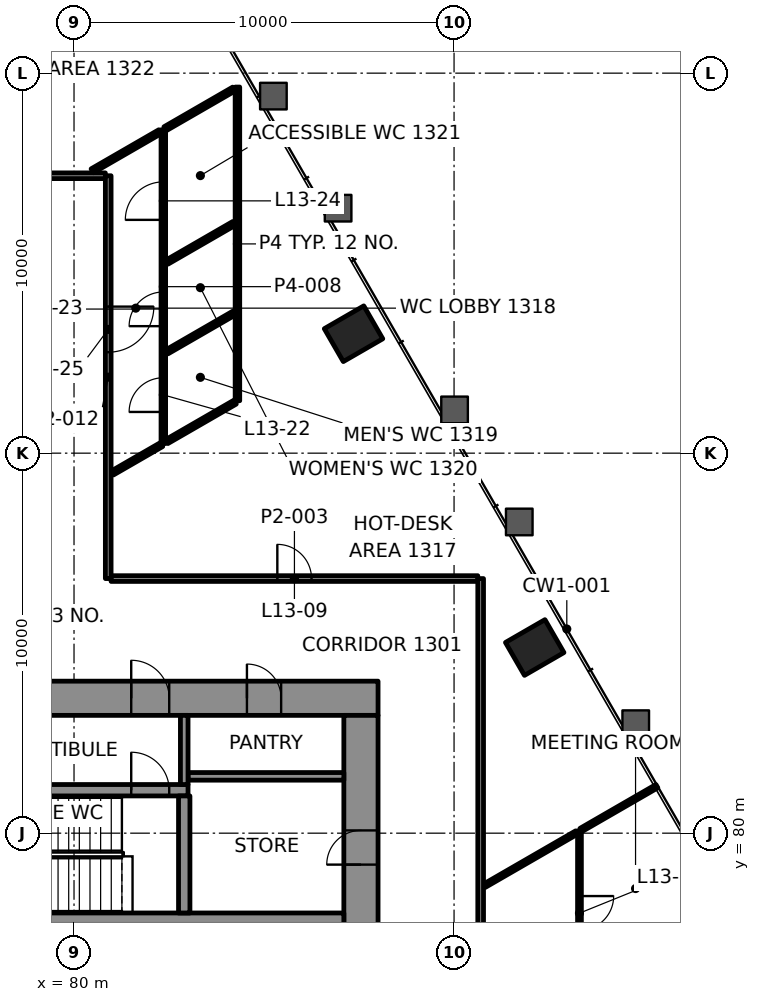
"""IFC4 building model, lengths in metres.
Left out: names, types, materials, properties, quantities, classifications, styles, units other than length and angle.
Written with IfcOpenShell. Run it as: python <this file> out.ifc"""

import sys

from ifc_helpers import new_model, si_unit, direction, frame, frame_2d, origin, origin_2d, place, context, subcontext, project, spatial, rectangle, extrude, element, fill, save


model = new_model("IFC4")
c1 = context("Model", 3, precision=1e-05, world=origin(), true_north=direction((0.0, 1.0)))
c2 = subcontext(c1, "Body", "Model", "MODEL_VIEW")
j1 = project(units=[si_unit("LENGTHUNIT", "METRE"), si_unit("PLANEANGLEUNIT", "RADIAN")], contexts=[c1])
p1 = place(None, origin())
s1 = spatial("IfcSite", under=j1, at=p1, CompositionType="ELEMENT")
p2 = place(p1, origin())
s2 = spatial("IfcBuilding", under=s1, at=p2, CompositionType="ELEMENT")
p3 = place(p2, frame((0.0, 0.0, 61.0)))
s3 = spatial("IfcBuildingStorey", under=s2, at=p3, CompositionType="ELEMENT", Elevation=61.0)
for number, where, z_axis, x_axis in (
    (1, (92.122, 84.885, -0.0), (0.0, 0.0, 1.0), (-0.5, 0.866, 0.0)),
    (2, (87.355, 93.143, -0.0), (0.0, 0.0, 1.0), (-0.5, 0.866, 0.0)),
):
    element("IfcColumn", number, at=place(p3, frame(where, z_axis=z_axis, x_axis=x_axis)), inside=s3, PredefinedType="COLUMN", context=c2, shape_type="SweptSolid", body=[
        extrude(rectangle(XDim=1.0, YDim=1.2, at=origin_2d()), origin(), (0.0, 0.0, 1.0), 4.2),
    ])
p4 = place(p3, frame((62.0, 83.55, 0.0), z_axis=(0.0, 0.0, 1.0), x_axis=(1.0, 0.0, 0.0)))
e3 = element("IfcWall", 3, at=p4, inside=s3, PredefinedType="SHEAR", context=c2, shape_type="SweptSolid", body=[
    extrude(rectangle(XDim=26.0, YDim=0.9, at=frame_2d((13.0, 0.0))), origin(), (0.0, 0.0, 1.0), 4.0),
])
p5 = place(p4, frame((5.695, 0.0, 0.0)))
e4 = element("IfcOpeningElement", 4, at=p5, cuts=e3, PredefinedType="OPENING", context=c2, shape_type="SweptSolid", body=[
    extrude(rectangle(XDim=1.0, YDim=2.1, at=frame_2d((0.5, 1.05))), frame((0.0, 0.46, 0.0), z_axis=(0.0, -1.0, 0.0), x_axis=(1.0, 0.0, 0.0)), (0.0, 0.0, 1.0), 0.92),
])
p6 = place(p4, frame((19.505, 0.0, 0.0)))
e5 = element("IfcOpeningElement", 5, at=p6, cuts=e3, PredefinedType="OPENING", context=c2, shape_type="SweptSolid", body=[
    extrude(rectangle(XDim=1.0, YDim=2.1, at=frame_2d((0.5, 1.05))), frame((0.0, 0.46, 0.0), z_axis=(0.0, -1.0, 0.0), x_axis=(1.0, 0.0, 0.0)), (0.0, 0.0, 1.0), 0.92),
])
p7 = place(p4, frame((3.45, 0.0, 0.0)))
e6 = element("IfcOpeningElement", 6, at=p7, cuts=e3, PredefinedType="OPENING", context=c2, shape_type="SweptSolid", body=[
    extrude(rectangle(XDim=0.9, YDim=2.1, at=frame_2d((0.45, 1.05))), frame((0.0, 0.46, 0.0), z_axis=(0.0, -1.0, 0.0), x_axis=(1.0, 0.0, 0.0)), (0.0, 0.0, 1.0), 0.92),
])
p8 = place(p4, frame((12.65, 0.0, 0.0)))
e7 = element("IfcOpeningElement", 7, at=p8, cuts=e3, PredefinedType="OPENING", context=c2, shape_type="SweptSolid", body=[
    extrude(rectangle(XDim=0.9, YDim=2.1, at=frame_2d((0.45, 1.05))), frame((0.0, 0.46, 0.0), z_axis=(0.0, -1.0, 0.0), x_axis=(1.0, 0.0, 0.0)), (0.0, 0.0, 1.0), 0.92),
])
p9 = place(p4, frame((22.55, 0.0, 0.0)))
e8 = element("IfcOpeningElement", 8, at=p9, cuts=e3, PredefinedType="OPENING", context=c2, shape_type="SweptSolid", body=[
    extrude(rectangle(XDim=0.9, YDim=2.1, at=frame_2d((0.45, 1.05))), frame((0.0, 0.46, 0.0), z_axis=(0.0, -1.0, 0.0), x_axis=(1.0, 0.0, 0.0)), (0.0, 0.0, 1.0), 0.92),
])
p10 = place(p3, frame((87.55, 66.9, 0.0), z_axis=(0.0, 0.0, 1.0), x_axis=(0.0, 1.0, 0.0)))
e9 = element("IfcWall", 9, at=p10, inside=s3, PredefinedType="SHEAR", context=c2, shape_type="SweptSolid", body=[
    extrude(rectangle(XDim=16.2, YDim=0.9, at=frame_2d((8.1, 0.0))), origin(), (0.0, 0.0, 1.0), 4.0),
])
p11 = place(p10, frame((5.5, 0.0, 0.0)))
e10 = element("IfcOpeningElement", 10, at=p11, cuts=e9, PredefinedType="OPENING", context=c2, shape_type="SweptSolid", body=[
    extrude(rectangle(XDim=1.8, YDim=2.1, at=frame_2d((0.9, 1.05))), frame((0.0, 0.46, 0.0), z_axis=(0.0, -1.0, 0.0), x_axis=(1.0, 0.0, 0.0)), (0.0, 0.0, 1.0), 0.92),
])
p12 = place(p10, frame((12.272, 0.0, 0.0)))
e11 = element("IfcOpeningElement", 11, at=p12, cuts=e9, PredefinedType="OPENING", context=c2, shape_type="SweptSolid", body=[
    extrude(rectangle(XDim=0.9, YDim=2.1, at=frame_2d((0.45, 1.05))), frame((0.0, 0.46, 0.0), z_axis=(0.0, -1.0, 0.0), x_axis=(1.0, 0.0, 0.0)), (0.0, 0.0, 1.0), 0.92),
])
p13 = place(p3, frame((64.35, 77.75, 0.0), z_axis=(0.0, 0.0, 1.0), x_axis=(1.0, 0.0, 0.0)))
e12 = element("IfcWall", 12, at=p13, inside=s3, PredefinedType="SHEAR", context=c2, shape_type="SweptSolid", body=[
    extrude(rectangle(XDim=22.75, YDim=0.3, at=frame_2d((11.375, 0.0))), origin(), (0.0, 0.0, 1.0), 4.0),
])
p14 = place(p13, frame((3.345, 0.0, 0.0)))
e13 = element("IfcOpeningElement", 13, at=p14, cuts=e12, PredefinedType="OPENING", context=c2, shape_type="SweptSolid", body=[
    extrude(rectangle(XDim=1.0, YDim=2.1, at=frame_2d((0.5, 1.05))), frame((0.0, 0.16, 0.0), z_axis=(0.0, -1.0, 0.0), x_axis=(1.0, 0.0, 0.0)), (0.0, 0.0, 1.0), 0.32),
])
p15 = place(p3, frame((76.14, 81.13, 0.0), z_axis=(0.0, 0.0, 1.0), x_axis=(1.0, 0.0, 0.0)))
e14 = element("IfcWall", 14, at=p15, inside=s3, PredefinedType="SHEAR", context=c2, shape_type="SweptSolid", body=[
    extrude(rectangle(XDim=6.86, YDim=0.3, at=frame_2d((3.43, 0.0))), origin(), (0.0, 0.0, 1.0), 4.0),
])
p16 = place(p15, frame((5.365, 0.0, 0.0)))
e15 = element("IfcOpeningElement", 15, at=p16, cuts=e14, PredefinedType="OPENING", context=c2, shape_type="SweptSolid", body=[
    extrude(rectangle(XDim=1.0, YDim=2.1, at=frame_2d((0.5, 1.05))), frame((0.0, 0.16, 0.0), z_axis=(0.0, -1.0, 0.0), x_axis=(1.0, 0.0, 0.0)), (0.0, 0.0, 1.0), 0.32),
])
p17 = place(p3, frame((82.9, 77.9, 0.0), z_axis=(0.0, 0.0, 1.0), x_axis=(0.0, 1.0, 0.0)))
e16 = element("IfcWall", 16, at=p17, inside=s3, PredefinedType="SHEAR", context=c2, shape_type="SweptSolid", body=[
    extrude(rectangle(XDim=3.08, YDim=0.3, at=frame_2d((1.54, 0.0))), origin(), (0.0, 0.0, 1.0), 4.0),
])
p18 = place(p3, frame((80.975, 86.7, 0.0), z_axis=(0.0, 0.0, 1.0), x_axis=(1.0, 0.0, 0.0)))
e17 = element("IfcWall", 17, at=p18, inside=s3, PredefinedType="PARTITIONING", context=c2, shape_type="SweptSolid", body=[
    extrude(rectangle(XDim=9.649, YDim=0.15, at=frame_2d((4.825, 0.0))), origin(), (0.0, 0.0, 1.0), 3.4),
])
p19 = place(p18, frame((4.375, 0.0, 0.0)))
e18 = element("IfcOpeningElement", 18, at=p19, cuts=e17, PredefinedType="OPENING", context=c2, shape_type="SweptSolid", body=[
    extrude(rectangle(XDim=0.9, YDim=2.1, at=frame_2d((0.45, 1.05))), frame((0.0, 0.085, 0.0), z_axis=(0.0, -1.0, 0.0), x_axis=(1.0, 0.0, 0.0)), (0.0, 0.0, 1.0), 0.17),
])
p20 = place(p3, frame((75.975, 97.3, 0.0), z_axis=(0.0, 0.0, 1.0), x_axis=(1.0, 0.0, 0.0)))
e19 = element("IfcWall", 19, at=p20, inside=s3, PredefinedType="PARTITIONING", context=c2, shape_type="SweptSolid", body=[
    extrude(rectangle(XDim=4.85, YDim=0.15, at=frame_2d((2.425, 0.0))), origin(), (0.0, 0.0, 1.0), 3.4),
])
p21 = place(p20, frame((1.792, 0.0, 0.0)))
e20 = element("IfcOpeningElement", 20, at=p21, cuts=e19, PredefinedType="OPENING", context=c2, shape_type="SweptSolid", body=[
    extrude(rectangle(XDim=0.9, YDim=2.1, at=frame_2d((0.45, 1.05))), frame((0.0, 0.085, 0.0), z_axis=(0.0, -1.0, 0.0), x_axis=(1.0, 0.0, 0.0)), (0.0, 0.0, 1.0), 0.17),
])
p22 = place(p3, frame((93.376, 75.976, 0.0), z_axis=(0.0, 0.0, 1.0), x_axis=(0.866006192811, 0.500033272906, 0.0)))
e21 = element("IfcWall", 21, at=p22, inside=s3, PredefinedType="PARTITIONING", context=c2, shape_type="SweptSolid", body=[
    extrude(rectangle(XDim=4.329, YDim=0.1, at=frame_2d((2.165, 0.0))), origin(), (0.0, 0.0, 1.0), 3.165),
])
p23 = place(p3, frame((90.801, 78.618, 0.0), z_axis=(0.0, 0.0, 1.0), x_axis=(0.866028733576, 0.499994232587, 0.0)))
e22 = element("IfcWall", 22, at=p23, inside=s3, PredefinedType="PARTITIONING", context=c2, shape_type="SweptSolid", body=[
    extrude(rectangle(XDim=2.799, YDim=0.1, at=frame_2d((1.4, 0.0))), origin(), (0.0, 0.0, 1.0), 3.4),
])
p24 = place(p3, frame((81.01, 89.479, 0.0), z_axis=(0.0, 0.0, 1.0), x_axis=(0.866055123991, 0.49994851956, 0.0)))
e23 = element("IfcWall", 23, at=p24, inside=s3, PredefinedType="PARTITIONING", context=c2, shape_type="SweptSolid", body=[
    extrude(rectangle(XDim=1.496, YDim=0.12, at=frame_2d((0.748, 0.0))), origin(), (0.0, 0.0, 1.0), 3.4),
])
for number, where, z_axis, x_axis in (
    (24, (82.445, 92.666, 0.0), (0.0, 0.0, 1.0), (0.866, 0.5, 0.0)),
    (25, (82.444, 95.026, 0.0), (0.0, 0.0, 1.0), (0.866, 0.5, 0.0)),
):
    element("IfcWall", number, at=place(p3, frame(where, z_axis=z_axis, x_axis=x_axis)), inside=s3, PredefinedType="PARTITIONING", context=c2, shape_type="SweptSolid", body=[
        extrude(rectangle(XDim=2.033, YDim=0.12, at=frame_2d((1.017, 0.0))), origin(), (0.0, 0.0, 1.0), 3.4),
    ])
p25 = place(p3, frame((80.479, 97.43, 0.0), z_axis=(0.0, 0.0, 1.0), x_axis=(0.866057052383, 0.499945179012, 0.0)))
e26 = element("IfcWall", 26, at=p25, inside=s3, PredefinedType="PARTITIONING", context=c2, shape_type="SweptSolid", body=[
    extrude(rectangle(XDim=2.056, YDim=0.12, at=frame_2d((1.028, 0.0))), origin(), (0.0, 0.0, 1.0), 3.4),
])
p26 = place(p3, frame((93.3, 80.061, 0.0), z_axis=(0.0, 0.0, 1.0), x_axis=(0.0, -1.0, 0.0)))
e27 = element("IfcWall", 27, at=p26, inside=s3, PredefinedType="PARTITIONING", context=c2, shape_type="SweptSolid", body=[
    extrude(rectangle(XDim=11.527, YDim=0.1, at=frame_2d((5.764, 0.0))), origin(), (0.0, 0.0, 1.0), 3.4),
])
p27 = place(p26, frame((1.716, 0.0, 0.0)))
e28 = element("IfcOpeningElement", 28, at=p27, cuts=e27, PredefinedType="OPENING", context=c2, shape_type="SweptSolid", body=[
    extrude(rectangle(XDim=0.9, YDim=2.1, at=frame_2d((0.45, 1.05))), frame((0.0, 0.06, 0.0), z_axis=(0.0, -1.0, 0.0), x_axis=(1.0, 0.0, 0.0)), (0.0, 0.0, 1.0), 0.12),
])
p28 = place(p26, frame((5.741, 0.0, 0.0)))
e29 = element("IfcOpeningElement", 29, at=p28, cuts=e27, PredefinedType="OPENING", context=c2, shape_type="SweptSolid", body=[
    extrude(rectangle(XDim=0.9, YDim=2.1, at=frame_2d((0.45, 1.05))), frame((0.0, 0.06, 0.0), z_axis=(0.0, -1.0, 0.0), x_axis=(1.0, 0.0, 0.0)), (0.0, 0.0, 1.0), 0.12),
])
p29 = place(p26, frame((9.342, 0.0, 0.0)))
e30 = element("IfcOpeningElement", 30, at=p29, cuts=e27, PredefinedType="OPENING", context=c2, shape_type="SweptSolid", body=[
    extrude(rectangle(XDim=0.9, YDim=2.1, at=frame_2d((0.45, 1.05))), frame((0.0, 0.06, 0.0), z_axis=(0.0, -1.0, 0.0), x_axis=(1.0, 0.0, 0.0)), (0.0, 0.0, 1.0), 0.12),
])
p30 = place(p3, frame((90.7, 86.699, 0.0), z_axis=(0.0, 0.0, 1.0), x_axis=(0.0, -1.0, 0.0)))
e31 = element("IfcWall", 31, at=p30, inside=s3, PredefinedType="PARTITIONING", context=c2, shape_type="SweptSolid", body=[
    extrude(rectangle(XDim=19.725, YDim=0.15, at=frame_2d((9.862, 0.0))), origin(), (0.0, 0.0, 1.0), 3.4),
])
p31 = place(p30, frame((11.768, 0.0, 0.0)))
e32 = element("IfcOpeningElement", 32, at=p31, cuts=e31, PredefinedType="OPENING", context=c2, shape_type="SweptSolid", body=[
    extrude(rectangle(XDim=1.0, YDim=2.1, at=frame_2d((0.5, 1.05))), frame((0.0, 0.085, 0.0), z_axis=(0.0, -1.0, 0.0), x_axis=(1.0, 0.0, 0.0)), (0.0, 0.0, 1.0), 0.17),
])
p32 = place(p30, frame((17.459, 0.0, 0.0)))
e33 = element("IfcOpeningElement", 33, at=p32, cuts=e31, PredefinedType="OPENING", context=c2, shape_type="SweptSolid", body=[
    extrude(rectangle(XDim=1.0, YDim=2.1, at=frame_2d((0.5, 1.05))), frame((0.0, 0.085, 0.0), z_axis=(0.0, -1.0, 0.0), x_axis=(1.0, 0.0, 0.0)), (0.0, 0.0, 1.0), 0.17),
])
p33 = place(p3, frame((84.3, 91.379, 0.0), z_axis=(0.0, 0.0, 1.0), x_axis=(0.0, 1.0, 0.0)))
e34 = element("IfcWall", 34, at=p33, inside=s3, PredefinedType="PARTITIONING", context=c2, shape_type="SweptSolid", body=[
    extrude(rectangle(XDim=8.255, YDim=0.12, at=frame_2d((4.127, 0.0))), origin(), (0.0, 0.0, 1.0), 3.165),
])
p34 = place(p3, frame((82.35, 90.253, 0.0), z_axis=(0.0, 0.0, 1.0), x_axis=(0.0, 1.0, 0.0)))
e35 = element("IfcWall", 35, at=p34, inside=s3, PredefinedType="PARTITIONING", context=c2, shape_type="SweptSolid", body=[
    extrude(rectangle(XDim=8.257, YDim=0.12, at=frame_2d((4.128, 0.0))), origin(), (0.0, 0.0, 1.0), 3.4),
])
p35 = place(p34, frame((0.831, 0.0, 0.0)))
e36 = element("IfcOpeningElement", 36, at=p35, cuts=e35, PredefinedType="OPENING", context=c2, shape_type="SweptSolid", body=[
    extrude(rectangle(XDim=0.9, YDim=2.1, at=frame_2d((0.45, 1.05))), frame((0.0, 0.07, 0.0), z_axis=(0.0, -1.0, 0.0), x_axis=(1.0, 0.0, 0.0)), (0.0, 0.0, 1.0), 0.14),
])
p36 = place(p34, frame((3.089, 0.0, 0.0)))
e37 = element("IfcOpeningElement", 37, at=p36, cuts=e35, PredefinedType="OPENING", context=c2, shape_type="SweptSolid", body=[
    extrude(rectangle(XDim=0.9, YDim=2.1, at=frame_2d((0.45, 1.05))), frame((0.0, 0.07, 0.0), z_axis=(0.0, -1.0, 0.0), x_axis=(1.0, 0.0, 0.0)), (0.0, 0.0, 1.0), 0.14),
])
p37 = place(p34, frame((5.886, 0.0, 0.0)))
e38 = element("IfcOpeningElement", 38, at=p37, cuts=e35, PredefinedType="OPENING", context=c2, shape_type="SweptSolid", body=[
    extrude(rectangle(XDim=1.0, YDim=2.1, at=frame_2d((0.5, 1.05))), frame((0.0, 0.07, 0.0), z_axis=(0.0, -1.0, 0.0), x_axis=(1.0, 0.0, 0.0)), (0.0, 0.0, 1.0), 0.14),
])
p38 = place(p3, frame((80.9, 97.3, 0.0), z_axis=(0.0, 0.0, 1.0), x_axis=(0.0, -1.0, 0.0)))
e39 = element("IfcWall", 39, at=p38, inside=s3, PredefinedType="PARTITIONING", context=c2, shape_type="SweptSolid", body=[
    extrude(rectangle(XDim=10.6, YDim=0.15, at=frame_2d((5.3, 0.0))), origin(), (0.0, 0.0, 1.0), 3.4),
])
p39 = place(p38, frame((3.444, 0.0, 0.0)))
e40 = element("IfcOpeningElement", 40, at=p39, cuts=e39, PredefinedType="OPENING", context=c2, shape_type="SweptSolid", body=[
    extrude(rectangle(XDim=1.2, YDim=2.1, at=frame_2d((0.6, 1.05))), frame((0.0, 0.085, 0.0), z_axis=(0.0, -1.0, 0.0), x_axis=(1.0, 0.0, 0.0)), (0.0, 0.0, 1.0), 0.17),
])
p40 = place(p3, frame((93.337, 80.083, 0.0), z_axis=(0.0, 0.0, 1.0), x_axis=(0.866028885721, 0.49999396906, 0.0)))
e41 = element("IfcWall", 41, at=p40, inside=s3, PredefinedType="PARTITIONING", context=c2, shape_type="SweptSolid", body=[
    extrude(rectangle(XDim=2.309, YDim=0.1, at=frame_2d((1.155, 0.0))), origin(), (0.0, 0.0, 1.0), 3.165),
])
p41 = place(p3, frame((82.44, 90.304, 0.0), z_axis=(0.0, 0.0, 1.0), x_axis=(0.866044773228, 0.499966449638, 0.0)))
e42 = element("IfcWall", 42, at=p41, inside=s3, PredefinedType="PARTITIONING", context=c2, shape_type="SweptSolid", body=[
    extrude(rectangle(XDim=2.079, YDim=0.12, at=frame_2d((1.04, 0.0))), origin(), (0.0, 0.0, 1.0), 3.4),
])
p42 = place(p3, frame((82.395, 98.536, 0.0), z_axis=(0.0, 0.0, 1.0), x_axis=(0.866041603473, 0.499971940267, 0.0)))
e43 = element("IfcWall", 43, at=p42, inside=s3, PredefinedType="PARTITIONING", context=c2, shape_type="SweptSolid", body=[
    extrude(rectangle(XDim=2.089, YDim=0.12, at=frame_2d((1.045, 0.0))), origin(), (0.0, 0.0, 1.0), 3.165),
])
p43 = place(p3, frame((83.0, 81.495, 0.0), z_axis=(0.0, 0.0, 1.0), x_axis=(1.0, 0.0, 0.0)))
e44 = element("IfcWall", 44, at=p43, inside=s3, PredefinedType="PARTITIONING", context=c2, shape_type="SweptSolid", body=[
    extrude(rectangle(XDim=4.1, YDim=0.2, at=frame_2d((2.05, 0.0))), origin(), (0.0, 0.0, 1.0), 4.0),
])
p44 = place(p3, frame((82.9, 81.28, 0.0), z_axis=(0.0, 0.0, 1.0), x_axis=(0.0, 1.0, 0.0)))
e45 = element("IfcWall", 45, at=p44, inside=s3, PredefinedType="PARTITIONING", context=c2, shape_type="SweptSolid", body=[
    extrude(rectangle(XDim=1.82, YDim=0.2, at=frame_2d((0.91, 0.0))), origin(), (0.0, 0.0, 1.0), 4.0),
])
p45 = place(p19, origin())
e46 = element("IfcDoor", 46, at=p45, inside=s3, OperationType="SINGLE_SWING_RIGHT", PredefinedType="DOOR", context=c2, shape_type="SweptSolid", body=[
    extrude(rectangle(XDim=0.9, YDim=2.1, at=frame_2d((0.45, 1.05))), frame((0.0, 0.025, 0.0), z_axis=(0.0, -1.0, 0.0), x_axis=(1.0, 0.0, 0.0)), (0.0, 0.0, 1.0), 0.05),
])
fill(e18, e46)
p46 = place(p27, origin())
e47 = element("IfcDoor", 47, at=p46, inside=s3, OperationType="SINGLE_SWING_RIGHT", PredefinedType="DOOR", context=c2, shape_type="SweptSolid", body=[
    extrude(rectangle(XDim=0.9, YDim=2.1, at=frame_2d((0.45, 1.05))), frame((0.0, 0.025, 0.0), z_axis=(0.0, -1.0, 0.0), x_axis=(1.0, 0.0, 0.0)), (0.0, 0.0, 1.0), 0.05),
])
fill(e28, e47)
p47 = place(p35, origin())
e48 = element("IfcDoor", 48, at=p47, inside=s3, OperationType="SINGLE_SWING_RIGHT", PredefinedType="DOOR", context=c2, shape_type="SweptSolid", body=[
    extrude(rectangle(XDim=0.9, YDim=2.1, at=frame_2d((0.45, 1.05))), frame((0.0, 0.025, 0.0), z_axis=(0.0, -1.0, 0.0), x_axis=(1.0, 0.0, 0.0)), (0.0, 0.0, 1.0), 0.05),
])
fill(e36, e48)
p48 = place(p36, origin())
e49 = element("IfcDoor", 49, at=p48, inside=s3, OperationType="SINGLE_SWING_LEFT", PredefinedType="DOOR", context=c2, shape_type="SweptSolid", body=[
    extrude(rectangle(XDim=0.9, YDim=2.1, at=frame_2d((0.45, 1.05))), frame((0.0, 0.025, 0.0), z_axis=(0.0, -1.0, 0.0), x_axis=(1.0, 0.0, 0.0)), (0.0, 0.0, 1.0), 0.05),
])
fill(e37, e49)
p49 = place(p37, origin())
e50 = element("IfcDoor", 50, at=p49, inside=s3, OperationType="SINGLE_SWING_RIGHT", PredefinedType="DOOR", context=c2, shape_type="SweptSolid", body=[
    extrude(rectangle(XDim=1.0, YDim=2.1, at=frame_2d((0.5, 1.05))), frame((0.0, 0.025, 0.0), z_axis=(0.0, -1.0, 0.0), x_axis=(1.0, 0.0, 0.0)), (0.0, 0.0, 1.0), 0.05),
])
fill(e38, e50)
p50 = place(p39, origin())
e51 = element("IfcDoor", 51, at=p50, inside=s3, OperationType="DOUBLE_DOOR_SINGLE_SWING", PredefinedType="DOOR", context=c2, shape_type="SweptSolid", body=[
    extrude(rectangle(XDim=1.2, YDim=2.1, at=frame_2d((0.6, 1.05))), frame((0.0, 0.025, 0.0), z_axis=(0.0, -1.0, 0.0), x_axis=(1.0, 0.0, 0.0)), (0.0, 0.0, 1.0), 0.05),
])
fill(e40, e51)
p51 = place(p16, origin())
e52 = element("IfcDoor", 52, at=p51, inside=s3, OperationType="SINGLE_SWING_RIGHT", PredefinedType="DOOR", context=c2, shape_type="SweptSolid", body=[
    extrude(rectangle(XDim=1.0, YDim=2.1, at=frame_2d((0.5, 1.05))), frame((0.0, 0.025, 0.0), z_axis=(0.0, -1.0, 0.0), x_axis=(1.0, 0.0, 0.0)), (0.0, 0.0, 1.0), 0.05),
])
fill(e15, e52)
p52 = place(p6, origin())
e53 = element("IfcDoor", 53, at=p52, inside=s3, OperationType="SINGLE_SWING_LEFT", PredefinedType="DOOR", context=c2, shape_type="SweptSolid", body=[
    extrude(rectangle(XDim=1.0, YDim=2.1, at=frame_2d((0.5, 1.05))), frame((0.0, 0.17, 0.0), z_axis=(0.0, -1.0, 0.0), x_axis=(1.0, 0.0, 0.0)), (0.0, 0.0, 1.0), 0.34),
])
fill(e5, e53)
p53 = place(p12, origin())
e54 = element("IfcDoor", 54, at=p53, inside=s3, OperationType="SINGLE_SWING_RIGHT", PredefinedType="DOOR", context=c2, shape_type="SweptSolid", body=[
    extrude(rectangle(XDim=0.9, YDim=2.1, at=frame_2d((0.45, 1.05))), frame((0.0, 0.17, 0.0), z_axis=(0.0, -1.0, 0.0), x_axis=(1.0, 0.0, 0.0)), (0.0, 0.0, 1.0), 0.34),
])
fill(e11, e54)
p54 = place(p9, origin())
e55 = element("IfcDoor", 55, at=p54, inside=s3, OperationType="SINGLE_SWING_LEFT", PredefinedType="DOOR", context=c2, shape_type="SweptSolid", body=[
    extrude(rectangle(XDim=0.9, YDim=2.1, at=frame_2d((0.45, 1.05))), frame((0.0, 0.17, 0.0), z_axis=(0.0, -1.0, 0.0), x_axis=(1.0, 0.0, 0.0)), (0.0, 0.0, 1.0), 0.34),
])
fill(e8, e55)
save(model, sys.argv[1])
